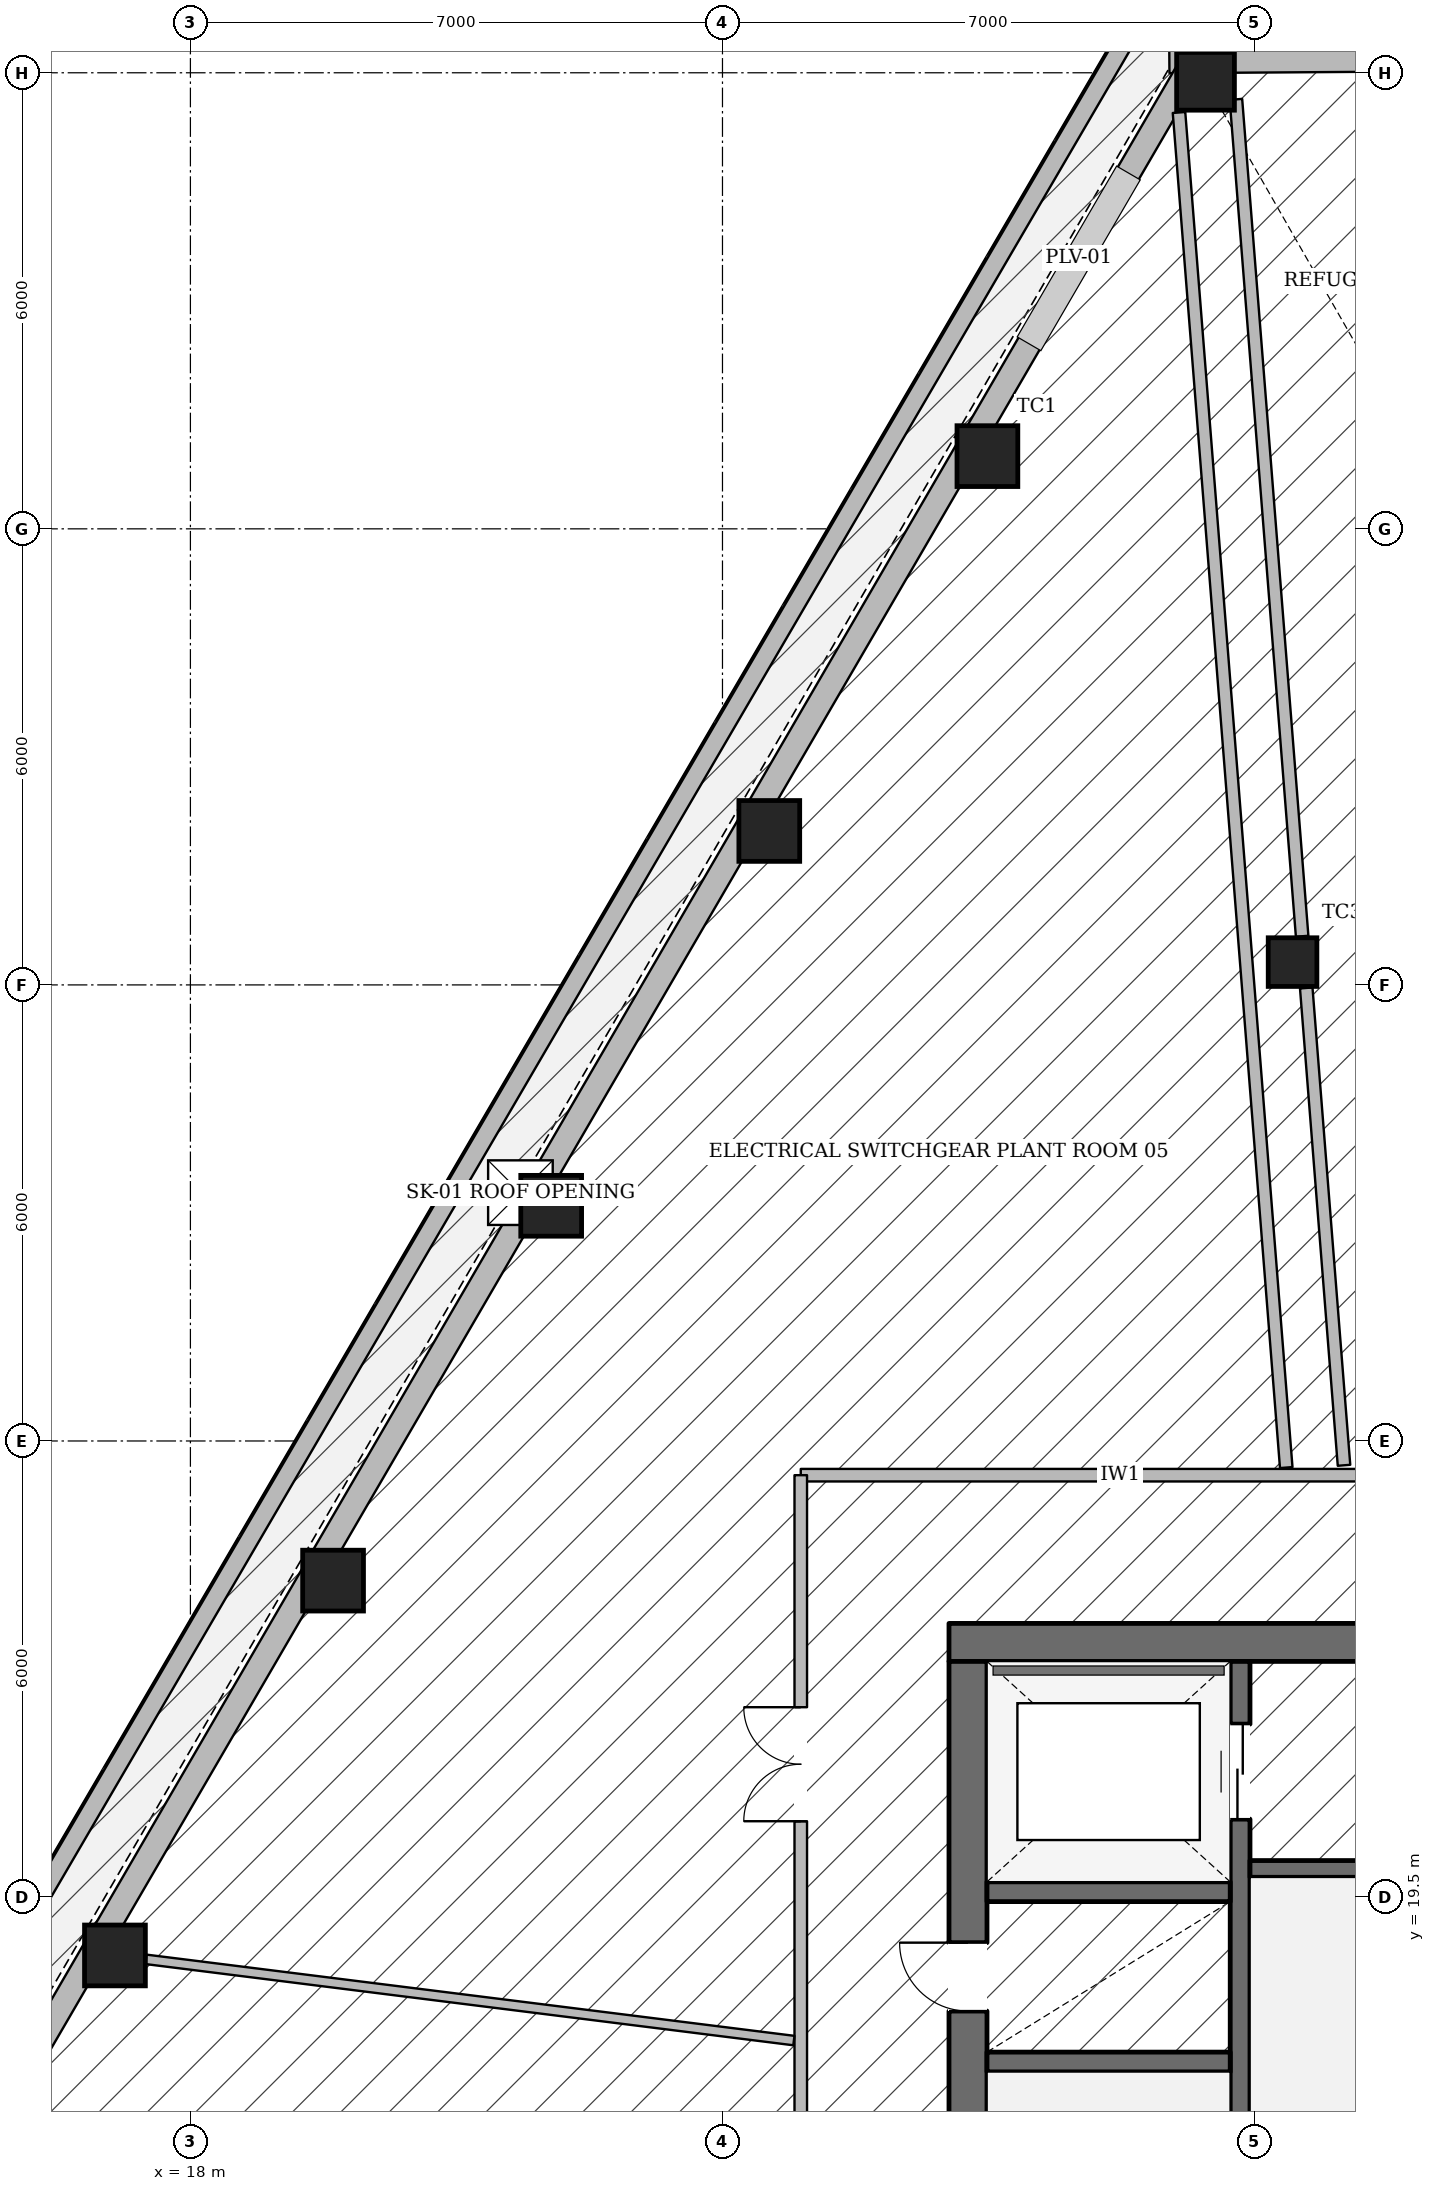
"""IFC4 building model, lengths in metres.
Left out: names, types, materials, properties, quantities, classifications, styles, units other than length and angle.
Written with IfcOpenShell. Run it as: python <this file> out.ifc"""

import sys

from ifc_helpers import new_model, si_unit, direction, frame, frame_2d, origin, origin_2d, place, context, subcontext, project, spatial, rectangle, hollow_rectangle, extrude, element, fill, save


model = new_model("IFC4")
c1 = context("Model", 3, precision=1e-05, world=origin(), true_north=direction((0.0, 1.0)))
c2 = subcontext(c1, "Body", "Model", "MODEL_VIEW")
j1 = project(units=[si_unit("LENGTHUNIT", "METRE"), si_unit("PLANEANGLEUNIT", "RADIAN")], contexts=[c1])
p1 = place(None, origin())
s1 = spatial("IfcSite", under=j1, at=p1, CompositionType="ELEMENT")
p2 = place(p1, origin())
s2 = spatial("IfcBuilding", under=s1, at=p2, CompositionType="ELEMENT")
p3 = place(p2, frame((0.0, 0.0, 75.3)))
s3 = spatial("IfcBuildingStorey", under=s2, at=p3, CompositionType="ELEMENT", Elevation=75.3)
p4 = place(p3, frame((27.98, 22.85, 0.0), z_axis=(0.0, 0.0, 1.0), x_axis=(1.0, 0.0, 0.0)))
e1 = element("IfcWall", 1, at=p4, inside=s3, PredefinedType="SOLIDWALL", context=c2, shape_type="SweptSolid", body=[
    extrude(rectangle(XDim=20.04, YDim=0.5, at=frame_2d((10.02, 0.0))), origin(), (0.0, 0.0, 1.0), 4.985),
])
p5 = place(p4, frame((6.295, 0.0, 0.0)))
e2 = element("IfcOpeningElement", 2, at=p5, cuts=e1, PredefinedType="OPENING", context=c2, shape_type="SweptSolid", body=[
    extrude(rectangle(XDim=1.05, YDim=2.15, at=frame_2d((0.525, 1.075))), frame((0.0, 0.26, 0.0), z_axis=(0.0, -1.0, 0.0), x_axis=(1.0, 0.0, 0.0)), (0.0, 0.0, 1.0), 0.52),
])
p6 = place(p4, frame((12.695, 0.0, 0.0)))
e3 = element("IfcOpeningElement", 3, at=p6, cuts=e1, PredefinedType="OPENING", context=c2, shape_type="SweptSolid", body=[
    extrude(rectangle(XDim=1.05, YDim=2.15, at=frame_2d((0.525, 1.075))), frame((0.0, 0.26, 0.0), z_axis=(0.0, -1.0, 0.0), x_axis=(1.0, 0.0, 0.0)), (0.0, 0.0, 1.0), 0.52),
])
p7 = place(p3, frame((28.23, 9.6, 0.0), z_axis=(0.0, 0.0, 1.0), x_axis=(0.0, 1.0, 0.0)))
e4 = element("IfcWall", 4, at=p7, inside=s3, PredefinedType="SOLIDWALL", context=c2, shape_type="SweptSolid", body=[
    extrude(rectangle(XDim=13.0, YDim=0.5, at=frame_2d((6.5, 0.0))), origin(), (0.0, 0.0, 1.0), 4.985),
])
p8 = place(p7, frame((0.2, 0.0, 0.0)))
e5 = element("IfcOpeningElement", 5, at=p8, cuts=e4, PredefinedType="OPENING", context=c2, shape_type="SweptSolid", body=[
    extrude(rectangle(XDim=1.1, YDim=2.15, at=frame_2d((0.55, 1.075))), frame((0.0, 0.26, 0.0), z_axis=(0.0, -1.0, 0.0), x_axis=(1.0, 0.0, 0.0)), (0.0, 0.0, 1.0), 0.52),
])
p9 = place(p7, frame((8.4, 0.0, 0.0)))
e6 = element("IfcOpeningElement", 6, at=p9, cuts=e4, PredefinedType="OPENING", context=c2, shape_type="SweptSolid", body=[
    extrude(rectangle(XDim=0.9, YDim=2.1, at=frame_2d((0.45, 1.05))), frame((0.0, 0.26, 0.0), z_axis=(0.0, -1.0, 0.0), x_axis=(1.0, 0.0, 0.0)), (0.0, 0.0, 1.0), 0.52),
])
p10 = place(p3, frame((31.81, 9.6, 0.0), z_axis=(0.0, 0.0, 1.0), x_axis=(0.0, 1.0, 0.0)))
e7 = element("IfcWall", 7, at=p10, inside=s3, PredefinedType="SHEAR", context=c2, shape_type="SweptSolid", body=[
    extrude(rectangle(XDim=13.0, YDim=0.26, at=frame_2d((6.5, 0.0))), origin(), (0.0, 0.0, 1.0), 4.985),
])
p11 = place(p10, frame((10.925, 0.0, 0.0)))
e8 = element("IfcOpeningElement", 8, at=p11, cuts=e7, PredefinedType="OPENING", context=c2, shape_type="SweptSolid", body=[
    extrude(rectangle(XDim=1.25, YDim=2.25, at=frame_2d((0.625, 1.125))), frame((0.0, 0.14, 0.0), z_axis=(0.0, -1.0, 0.0), x_axis=(1.0, 0.0, 0.0)), (0.0, 0.0, 1.0), 0.28),
])
for number, where, z_axis, x_axis in (
    (9, (28.48, 17.33, 0.0), (0.0, 0.0, 1.0), (1.0, 0.0, 0.0)),
    (10, (28.48, 19.57, 0.0), (0.0, 0.0, 1.0), (1.0, 0.0, 0.0)),
):
    element("IfcWall", number, at=place(p3, frame(where, z_axis=z_axis, x_axis=x_axis)), inside=s3, PredefinedType="SHEAR", context=c2, shape_type="SweptSolid", body=[
        extrude(rectangle(XDim=3.2, YDim=0.26, at=frame_2d((1.6, 0.0))), origin(), (0.0, 0.0, 1.0), 4.985),
    ])
p12 = place(p3, frame((31.94, 19.87, 0.0), z_axis=(0.0, 0.0, 1.0), x_axis=(1.0, 0.0, 0.0)))
e11 = element("IfcWall", 11, at=p12, inside=s3, PredefinedType="SOLIDWALL", context=c2, shape_type="SweptSolid", body=[
    extrude(rectangle(XDim=12.12, YDim=0.22, at=frame_2d((6.06, 0.0))), origin(), (0.0, 0.0, 1.0), 4.985),
])
p13 = place(p12, frame((6.3, 0.0, 0.0)))
e12 = element("IfcOpeningElement", 12, at=p13, cuts=e11, PredefinedType="OPENING", context=c2, shape_type="SweptSolid", body=[
    extrude(rectangle(XDim=1.1, YDim=2.15, at=frame_2d((0.55, 1.075))), frame((0.0, 0.12, 0.0), z_axis=(0.0, -1.0, 0.0), x_axis=(1.0, 0.0, 0.0)), (0.0, 0.0, 1.0), 0.24),
])
p14 = place(p12, frame((8.23, 0.0, 0.0)))
e13 = element("IfcOpeningElement", 13, at=p14, cuts=e11, PredefinedType="OPENING", context=c2, shape_type="SweptSolid", body=[
    extrude(rectangle(XDim=0.9, YDim=2.1, at=frame_2d((0.45, 1.05))), frame((0.0, 0.12, 0.0), z_axis=(0.0, -1.0, 0.0), x_axis=(1.0, 0.0, 0.0)), (0.0, 0.0, 1.0), 0.24),
])
p15 = place(p12, frame((10.45, 0.0, 0.0)))
e14 = element("IfcOpeningElement", 14, at=p15, cuts=e11, PredefinedType="OPENING", context=c2, shape_type="SweptSolid", body=[
    extrude(rectangle(XDim=0.9, YDim=2.1, at=frame_2d((0.45, 1.05))), frame((0.0, 0.12, 0.0), z_axis=(0.0, -1.0, 0.0), x_axis=(1.0, 0.0, 0.0)), (0.0, 0.0, 1.0), 0.24),
])
p16 = place(p3, frame((31.355, 43.388, 0.0), z_axis=(0.0, 0.0, 1.0), x_axis=(1.0, 0.0, 0.0)))
e15 = element("IfcColumn", 15, at=p16, inside=s3, PredefinedType="COLUMN", context=c2, shape_type="SweptSolid", body=[
    extrude(hollow_rectangle(XDim=0.76, YDim=0.76, WallThickness=0.035, at=origin_2d()), origin(), (0.0, 0.0, 1.0), 4.985),
])
for number, where, z_axis, x_axis in (
    (16, (28.486, 38.457, 0.0), (0.0, 0.0, 1.0), (1.0, 0.0, 0.0)),
    (17, (25.616, 33.525, 0.0), (0.0, 0.0, 1.0), (1.0, 0.0, 0.0)),
    (18, (22.746, 28.594, 0.0), (0.0, 0.0, 1.0), (1.0, 0.0, 0.0)),
    (19, (19.877, 23.663, 0.0), (0.0, 0.0, 1.0), (1.0, 0.0, 0.0)),
    (20, (17.007, 18.732, 0.0), (0.0, 0.0, 1.0), (1.0, 0.0, 0.0)),
):
    element("IfcColumn", number, at=place(p3, frame(where, z_axis=z_axis, x_axis=x_axis)), inside=s3, PredefinedType="COLUMN", context=c2, shape_type="SweptSolid", body=[
        extrude(hollow_rectangle(XDim=0.8, YDim=0.8, WallThickness=0.036, at=origin_2d()), origin(), (0.0, 0.0, 1.0), 4.985),
    ])
p17 = place(p3, frame((32.5, 31.8, 0.0), z_axis=(0.0, 0.0, 1.0), x_axis=(1.0, 0.0, 0.0)))
e21 = element("IfcColumn", 21, at=p17, inside=s3, PredefinedType="COLUMN", context=c2, shape_type="SweptSolid", body=[
    extrude(hollow_rectangle(XDim=0.64, YDim=0.64, WallThickness=0.028, at=origin_2d()), origin(), (0.0, 0.0, 1.0), 4.985),
])
p18 = place(p3, frame((30.879, 43.655, 0.0), z_axis=(0.0, 0.0, 1.0), x_axis=(0.999976431896, 0.006865540883, 0.0)))
e22 = element("IfcWall", 22, at=p18, inside=s3, PredefinedType="STANDARD", context=c2, shape_type="SweptSolid", body=[
    extrude(rectangle(XDim=14.082, YDim=0.32, at=frame_2d((7.041, 0.0))), origin(), (0.0, 0.0, 1.0), 3.677),
])
p19 = place(p3, frame((13.665, 13.524, 0.0), z_axis=(0.0, 0.0, 1.0), x_axis=(0.50295003743, 0.864315486295, 0.0)))
e23 = element("IfcWall", 23, at=p19, inside=s3, PredefinedType="STANDARD", context=c2, shape_type="SweptSolid", body=[
    extrude(rectangle(XDim=35.184, YDim=0.32, at=frame_2d((17.592, 0.0))), origin(), (0.0, 0.0, 1.0), 3.677),
])
p20 = place(p3, frame((30.821, 44.822, 0.0), z_axis=(0.0, 0.0, 1.0), x_axis=(-0.504421897802, -0.863457323218, 0.0)))
e24 = element("IfcWall", 24, at=p20, inside=s3, PredefinedType="PARAPET", context=c2, shape_type="SweptSolid", body=[
    extrude(rectangle(XDim=36.395, YDim=0.24, at=frame_2d((18.197, 0.0))), origin(), (0.0, 0.0, 1.0), 1.25),
])
p21 = place(p3, frame((26.03, 25.05, 0.0), z_axis=(0.0, 0.0, 1.0), x_axis=(1.0, 0.0, 0.0)))
e25 = element("IfcWall", 25, at=p21, inside=s3, PredefinedType="PARTITIONING", context=c2, shape_type="SweptSolid", body=[
    extrude(rectangle(XDim=23.94, YDim=0.165, at=frame_2d((11.97, 0.0))), origin(), (0.0, 0.0, 1.0), 4.985),
])
p22 = place(p21, frame((19.911, 0.0, 0.0)))
e26 = element("IfcOpeningElement", 26, at=p22, cuts=e25, PredefinedType="OPENING", context=c2, shape_type="SweptSolid", body=[
    extrude(rectangle(XDim=1.5, YDim=2.25, at=frame_2d((0.75, 1.125))), frame((0.0, 0.093, 0.0), z_axis=(0.0, -1.0, 0.0), x_axis=(1.0, 0.0, 0.0)), (0.0, 0.0, 1.0), 0.185),
])
p23 = place(p21, frame((13.458, 0.0, 0.0)))
e27 = element("IfcOpeningElement", 27, at=p23, cuts=e25, PredefinedType="OPENING", context=c2, shape_type="SweptSolid", body=[
    extrude(rectangle(XDim=1.5, YDim=2.25, at=frame_2d((0.75, 1.125))), frame((0.0, 0.093, 0.0), z_axis=(0.0, -1.0, 0.0), x_axis=(1.0, 0.0, 0.0)), (0.0, 0.0, 1.0), 0.185),
])
p24 = place(p21, frame((8.656, 0.0, 0.0)))
e28 = element("IfcOpeningElement", 28, at=p24, cuts=e25, PredefinedType="OPENING", context=c2, shape_type="SweptSolid", body=[
    extrude(rectangle(XDim=1.5, YDim=2.25, at=frame_2d((0.75, 1.125))), frame((0.0, 0.093, 0.0), z_axis=(0.0, -1.0, 0.0), x_axis=(1.0, 0.0, 0.0)), (0.0, 0.0, 1.0), 0.185),
])
p25 = place(p3, frame((26.03, 7.15, 0.0), z_axis=(0.0, 0.0, 1.0), x_axis=(0.0, 1.0, 0.0)))
e29 = element("IfcWall", 29, at=p25, inside=s3, PredefinedType="PARTITIONING", context=c2, shape_type="SweptSolid", body=[
    extrude(rectangle(XDim=17.9, YDim=0.165, at=frame_2d((8.95, 0.0))), origin(), (0.0, 0.0, 1.0), 4.985),
])
p26 = place(p25, frame((13.347, 0.0, 0.0)))
e30 = element("IfcOpeningElement", 30, at=p26, cuts=e29, PredefinedType="OPENING", context=c2, shape_type="SweptSolid", body=[
    extrude(rectangle(XDim=1.5, YDim=2.25, at=frame_2d((0.75, 1.125))), frame((0.0, 0.093, 0.0), z_axis=(0.0, -1.0, 0.0), x_axis=(1.0, 0.0, 0.0)), (0.0, 0.0, 1.0), 0.185),
])
p27 = place(p25, frame((6.697, 0.0, 0.0)))
e31 = element("IfcOpeningElement", 31, at=p27, cuts=e29, PredefinedType="OPENING", context=c2, shape_type="SweptSolid", body=[
    extrude(rectangle(XDim=1.5, YDim=2.25, at=frame_2d((0.75, 1.125))), frame((0.0, 0.093, 0.0), z_axis=(0.0, -1.0, 0.0), x_axis=(1.0, 0.0, 0.0)), (0.0, 0.0, 1.0), 0.185),
])
p28 = place(p25, frame((1.147, 0.0, 0.0)))
e32 = element("IfcOpeningElement", 32, at=p28, cuts=e29, PredefinedType="OPENING", context=c2, shape_type="SweptSolid", body=[
    extrude(rectangle(XDim=1.5, YDim=2.25, at=frame_2d((0.75, 1.125))), frame((0.0, 0.093, 0.0), z_axis=(0.0, -1.0, 0.0), x_axis=(1.0, 0.0, 0.0)), (0.0, 0.0, 1.0), 0.185),
])
p29 = place(p3, frame((32.417, 25.15, 0.0), z_axis=(0.0, 0.0, 1.0), x_axis=(-0.078880286834, 0.996884095745, 0.0)))
e33 = element("IfcWall", 33, at=p29, inside=s3, PredefinedType="PARTITIONING", context=c2, shape_type="SweptSolid", body=[
    extrude(rectangle(XDim=17.883, YDim=0.165, at=frame_2d((8.942, 0.0))), origin(), (0.0, 0.0, 1.0), 4.985),
])
p30 = place(p3, frame((33.177, 25.18, 0.0), z_axis=(0.0, 0.0, 1.0), x_axis=(-0.078865664547, 0.996885252652, 0.0)))
e34 = element("IfcWall", 34, at=p30, inside=s3, PredefinedType="PARTITIONING", context=c2, shape_type="SweptSolid", body=[
    extrude(rectangle(XDim=6.3, YDim=0.165, at=frame_2d((3.15, 0.0))), origin(), (0.0, 0.0, 1.0), 4.985),
])
p31 = place(p3, frame((32.626, 32.14, 0.0), z_axis=(0.0, 0.0, 1.0), x_axis=(-0.078892101665, 0.996883160804, 0.0)))
e35 = element("IfcWall", 35, at=p31, inside=s3, PredefinedType="PARTITIONING", context=c2, shape_type="SweptSolid", body=[
    extrude(rectangle(XDim=11.045, YDim=0.165, at=frame_2d((5.522, 0.0))), origin(), (0.0, 0.0, 1.0), 4.985),
])
p32 = place(p3, frame((25.939, 17.612, 0.0), z_axis=(0.0, 0.0, 1.0), x_axis=(-0.992233655776, 0.124387991159, 0.0)))
e36 = element("IfcWall", 36, at=p32, inside=s3, PredefinedType="PARTITIONING", context=c2, shape_type="SweptSolid", body=[
    extrude(rectangle(XDim=8.591, YDim=0.125, at=frame_2d((4.295, 0.0))), origin(), (0.0, 0.0, 1.0), 3.68),
])
p33 = place(p3, frame((0.0, 0.0, -0.22)))
p34 = place(p33, frame((22.342, 28.767, 0.0)))
p35 = place(p34, frame((0.0, 0.0, 0.17)))
e37 = element("IfcWindow", 37, at=p35, inside=s3, PartitioningType="SINGLE_PANEL", PredefinedType="SKYLIGHT", context=c2, shape_type="SweptSolid", body=[
    extrude(rectangle(XDim=0.85, YDim=0.85, at=origin_2d()), origin(), (0.0, 0.0, 1.0), 0.05),
])
p36 = place(p9, origin())
e38 = element("IfcDoor", 38, at=p36, inside=s3, OperationType="SINGLE_SWING_RIGHT", PredefinedType="DOOR", context=c2, shape_type="SweptSolid", body=[
    extrude(rectangle(XDim=0.9, YDim=2.1, at=frame_2d((0.45, 1.05))), frame((0.0, 0.025, 0.0), z_axis=(0.0, -1.0, 0.0), x_axis=(1.0, 0.0, 0.0)), (0.0, 0.0, 1.0), 0.05),
])
fill(e6, e38)
p37 = place(p11, origin())
e39 = element("IfcDoor", 39, at=p37, inside=s3, OperationType="DOUBLE_DOOR_SLIDING", PredefinedType="DOOR", context=c2, shape_type="SweptSolid", body=[
    extrude(rectangle(XDim=1.25, YDim=2.25, at=frame_2d((0.625, 1.125))), frame((0.0, 0.025, 0.0), z_axis=(0.0, -1.0, 0.0), x_axis=(1.0, 0.0, 0.0)), (0.0, 0.0, 1.0), 0.05),
])
fill(e8, e39)
p38 = place(p26, origin())
e40 = element("IfcDoor", 40, at=p38, inside=s3, OperationType="DOUBLE_DOOR_SINGLE_SWING", PredefinedType="DOOR", context=c2, shape_type="SweptSolid", body=[
    extrude(rectangle(XDim=1.5, YDim=2.25, at=frame_2d((0.75, 1.125))), frame((0.0, 0.025, 0.0), z_axis=(0.0, -1.0, 0.0), x_axis=(1.0, 0.0, 0.0)), (0.0, 0.0, 1.0), 0.05),
])
fill(e30, e40)
save(model, sys.argv[1])
